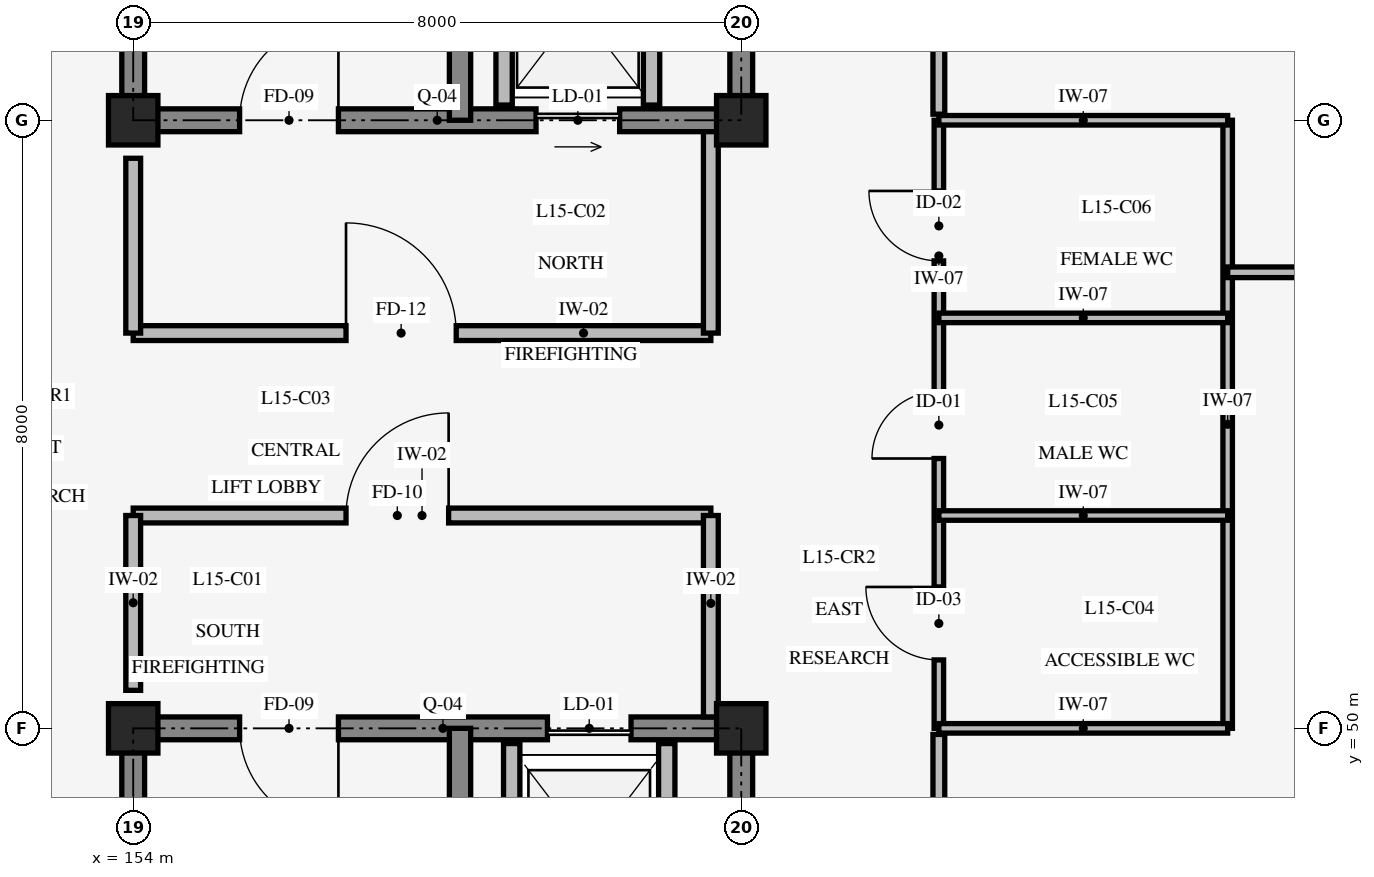
"""IFC4 building model, lengths in metres.
Left out: names, types, materials, properties, quantities, classifications, styles, units other than length and angle.
Written with IfcOpenShell. Run it as: python <this file> out.ifc"""

import sys

from ifc_helpers import new_model, si_unit, direction, frame, frame_2d, origin, origin_2d, place, context, subcontext, project, spatial, rectangle, extrude, element, fill, save


model = new_model("IFC4")
c1 = context("Model", 3, precision=1e-05, world=origin(), true_north=direction((0.0, 1.0)))
c2 = subcontext(c1, "Body", "Model", "MODEL_VIEW")
j1 = project(units=[si_unit("LENGTHUNIT", "METRE"), si_unit("PLANEANGLEUNIT", "RADIAN")], contexts=[c1])
p1 = place(None, origin())
s1 = spatial("IfcSite", under=j1, at=p1, CompositionType="ELEMENT")
p2 = place(p1, origin())
s2 = spatial("IfcBuilding", under=s1, at=p2, CompositionType="ELEMENT")
p3 = place(p2, frame((0.0, 0.0, 61.2)))
s3 = spatial("IfcBuildingStorey", under=s2, at=p3, CompositionType="ELEMENT", Elevation=61.2)
p4 = place(p3, frame((162.0, 42.0, 0.0), z_axis=(0.0, 0.0, 1.0), x_axis=(0.0, 1.0, 0.0)))
e1 = element("IfcWall", 1, at=p4, inside=s3, PredefinedType="SHEAR", context=c2, shape_type="SweptSolid", body=[
    extrude(rectangle(XDim=8.0, YDim=0.3, at=frame_2d((4.0, 0.0))), origin(), (0.0, 0.0, 1.0), 3.95),
])
p5 = place(p4, frame((3.175, 0.0, 0.0)))
e2 = element("IfcOpeningElement", 2, at=p5, cuts=e1, PredefinedType="OPENING", context=c2, shape_type="SweptSolid", body=[
    extrude(rectangle(XDim=1.05, YDim=2.2, at=frame_2d((0.525, 1.1))), frame((0.0, 0.16, 0.0), z_axis=(0.0, -1.0, 0.0), x_axis=(1.0, 0.0, 0.0)), (0.0, 0.0, 1.0), 0.32),
])
p6 = place(p3, frame((162.0, 50.0, 0.0), z_axis=(0.0, 0.0, 1.0), x_axis=(-1.0, 0.0, 0.0)))
e3 = element("IfcWall", 3, at=p6, inside=s3, PredefinedType="SHEAR", context=c2, shape_type="SweptSolid", body=[
    extrude(rectangle(XDim=8.0, YDim=0.3, at=frame_2d((4.0, 0.0))), origin(), (0.0, 0.0, 1.0), 3.95),
])
p7 = place(p6, frame((5.3, 0.0, 0.0)))
e4 = element("IfcOpeningElement", 4, at=p7, cuts=e3, PredefinedType="OPENING", context=c2, shape_type="SweptSolid", body=[
    extrude(rectangle(XDim=1.3, YDim=2.15, at=frame_2d((0.65, 1.075))), frame((0.0, 0.16, 0.0), z_axis=(0.0, -1.0, 0.0), x_axis=(1.0, 0.0, 0.0)), (0.0, 0.0, 1.0), 0.32),
])
p8 = place(p6, frame((1.45, 0.0, 0.0)))
e5 = element("IfcOpeningElement", 5, at=p8, cuts=e3, PredefinedType="OPENING", context=c2, shape_type="SweptSolid", body=[
    extrude(rectangle(XDim=1.1, YDim=2.2, at=frame_2d((0.55, 1.1))), frame((0.0, 0.16, 0.0), z_axis=(0.0, -1.0, 0.0), x_axis=(1.0, 0.0, 0.0)), (0.0, 0.0, 1.0), 0.32),
])
p9 = place(p3, frame((154.0, 50.0, 0.0), z_axis=(0.0, 0.0, 1.0), x_axis=(0.0, -1.0, 0.0)))
e6 = element("IfcWall", 6, at=p9, inside=s3, PredefinedType="SHEAR", context=c2, shape_type="SweptSolid", body=[
    extrude(rectangle(XDim=8.0, YDim=0.3, at=frame_2d((4.0, 0.0))), origin(), (0.0, 0.0, 1.0), 3.95),
])
p10 = place(p3, frame((158.3, 42.0, 0.0), z_axis=(0.0, 0.0, 1.0), x_axis=(0.0, 1.0, 0.0)))
e7 = element("IfcWall", 7, at=p10, inside=s3, PredefinedType="SHEAR", context=c2, shape_type="SweptSolid", body=[
    extrude(rectangle(XDim=8.0, YDim=0.28, at=frame_2d((4.0, 0.0))), origin(), (0.0, 0.0, 1.0), 3.95),
])
p11 = place(p3, frame((154.0, 58.0, 0.0), z_axis=(0.0, 0.0, 1.0), x_axis=(1.0, 0.0, 0.0)))
e8 = element("IfcWall", 8, at=p11, inside=s3, PredefinedType="SHEAR", context=c2, shape_type="SweptSolid", body=[
    extrude(rectangle(XDim=8.0, YDim=0.3, at=frame_2d((4.0, 0.0))), origin(), (0.0, 0.0, 1.0), 3.95),
])
p12 = place(p11, frame((1.4, 0.0, 0.0)))
e9 = element("IfcOpeningElement", 9, at=p12, cuts=e8, PredefinedType="OPENING", context=c2, shape_type="SweptSolid", body=[
    extrude(rectangle(XDim=1.3, YDim=2.15, at=frame_2d((0.65, 1.075))), frame((0.0, 0.16, 0.0), z_axis=(0.0, -1.0, 0.0), x_axis=(1.0, 0.0, 0.0)), (0.0, 0.0, 1.0), 0.32),
])
p13 = place(p11, frame((5.3, 0.0, 0.0)))
e10 = element("IfcOpeningElement", 10, at=p13, cuts=e8, PredefinedType="OPENING", context=c2, shape_type="SweptSolid", body=[
    extrude(rectangle(XDim=1.1, YDim=2.2, at=frame_2d((0.55, 1.1))), frame((0.0, 0.16, 0.0), z_axis=(0.0, -1.0, 0.0), x_axis=(1.0, 0.0, 0.0)), (0.0, 0.0, 1.0), 0.32),
])
p14 = place(p3, frame((162.0, 58.0, 0.0), z_axis=(0.0, 0.0, 1.0), x_axis=(0.0, 1.0, 0.0)))
e11 = element("IfcWall", 11, at=p14, inside=s3, PredefinedType="SHEAR", context=c2, shape_type="SweptSolid", body=[
    extrude(rectangle(XDim=8.0, YDim=0.3, at=frame_2d((4.0, 0.0))), origin(), (0.0, 0.0, 1.0), 3.95),
])
p15 = place(p14, frame((3.275, 0.0, 0.0)))
e12 = element("IfcOpeningElement", 12, at=p15, cuts=e11, PredefinedType="OPENING", context=c2, shape_type="SweptSolid", body=[
    extrude(rectangle(XDim=1.05, YDim=2.2, at=frame_2d((0.525, 1.1))), frame((0.0, 0.16, 0.0), z_axis=(0.0, -1.0, 0.0), x_axis=(1.0, 0.0, 0.0)), (0.0, 0.0, 1.0), 0.32),
])
p16 = place(p14, frame((5.45, 0.0, 0.0)))
e13 = element("IfcOpeningElement", 13, at=p16, cuts=e11, PredefinedType="OPENING", context=c2, shape_type="SweptSolid", body=[
    extrude(rectangle(XDim=1.4, YDim=2.3, at=frame_2d((0.7, 1.15))), frame((0.0, 0.16, 0.0), z_axis=(0.0, -1.0, 0.0), x_axis=(1.0, 0.0, 0.0)), (0.0, 0.0, 1.0), 0.32),
])
p17 = place(p3, frame((154.0, 66.0, 0.0), z_axis=(0.0, 0.0, 1.0), x_axis=(0.0, -1.0, 0.0)))
e14 = element("IfcWall", 14, at=p17, inside=s3, PredefinedType="SHEAR", context=c2, shape_type="SweptSolid", body=[
    extrude(rectangle(XDim=8.0, YDim=0.3, at=frame_2d((4.0, 0.0))), origin(), (0.0, 0.0, 1.0), 3.95),
])
p18 = place(p3, frame((158.3, 58.0, 0.0), z_axis=(0.0, 0.0, 1.0), x_axis=(0.0, 1.0, 0.0)))
e15 = element("IfcWall", 15, at=p18, inside=s3, PredefinedType="SHEAR", context=c2, shape_type="SweptSolid", body=[
    extrude(rectangle(XDim=8.0, YDim=0.28, at=frame_2d((4.0, 0.0))), origin(), (0.0, 0.0, 1.0), 3.95),
])
for number, where, z_axis, x_axis in (
    (16, (154.0, 50.0, 0.0), (0.0, 0.0, 1.0), (1.0, 0.0, 0.0)),
    (17, (154.0, 58.0, 0.0), (0.0, 0.0, 1.0), (1.0, 0.0, 0.0)),
    (18, (162.0, 50.0, 0.0), (0.0, 0.0, 1.0), (1.0, 0.0, 0.0)),
    (19, (162.0, 58.0, 0.0), (0.0, 0.0, 1.0), (1.0, 0.0, 0.0)),
):
    element("IfcColumn", number, at=place(p3, frame(where, z_axis=z_axis, x_axis=x_axis)), inside=s3, PredefinedType="COLUMN", context=c2, shape_type="SweptSolid", body=[
        extrude(rectangle(XDim=0.65, YDim=0.65, at=origin_2d()), origin(), (0.0, 0.0, 1.0), 4.2),
    ])
for number, where, z_axis, x_axis in (
    (20, (158.98, 47.02, 0.0), (0.0, 0.0, 1.0), (0.0, 1.0, 0.0)),
    (21, (161.02, 47.02, 0.0), (0.0, 0.0, 1.0), (0.0, 1.0, 0.0)),
):
    element("IfcWall", number, at=place(p3, frame(where, z_axis=z_axis, x_axis=x_axis)), inside=s3, PredefinedType="STANDARD", context=c2, shape_type="SweptSolid", body=[
        extrude(rectangle(XDim=2.78, YDim=0.215, at=frame_2d((1.39, 0.0))), origin(), (0.0, 0.0, 1.0), 3.9),
    ])
for number, where, z_axis, x_axis in (
    (22, (160.82, 58.2, 0.0), (0.0, 0.0, 1.0), (0.0, 1.0, 0.0)),
    (23, (158.88, 58.2, 0.0), (0.0, 0.0, 1.0), (0.0, 1.0, 0.0)),
):
    element("IfcWall", number, at=place(p3, frame(where, z_axis=z_axis, x_axis=x_axis)), inside=s3, PredefinedType="STANDARD", context=c2, shape_type="SweptSolid", body=[
        extrude(rectangle(XDim=2.55, YDim=0.215, at=frame_2d((1.275, 0.0))), origin(), (0.0, 0.0, 1.0), 3.9),
    ])
p19 = place(p3, frame((154.0, 52.8, 0.0), z_axis=(0.0, 0.0, 1.0), x_axis=(1.0, 0.0, 0.0)))
e24 = element("IfcWall", 24, at=p19, inside=s3, PredefinedType="STANDARD", context=c2, shape_type="SweptSolid", body=[
    extrude(rectangle(XDim=7.6, YDim=0.195, at=frame_2d((3.8, 0.0))), origin(), (0.0, 0.0, 1.0), 3.9),
])
p20 = place(p19, frame((2.8, 0.0, 0.0)))
e25 = element("IfcOpeningElement", 25, at=p20, cuts=e24, PredefinedType="OPENING", context=c2, shape_type="SweptSolid", body=[
    extrude(rectangle(XDim=1.35, YDim=2.15, at=frame_2d((0.675, 1.075))), frame((0.0, 0.107, 0.0), z_axis=(0.0, -1.0, 0.0), x_axis=(1.0, 0.0, 0.0)), (0.0, 0.0, 1.0), 0.215),
])
p21 = place(p3, frame((161.6, 50.15, 0.0), z_axis=(0.0, 0.0, 1.0), x_axis=(0.0, 1.0, 0.0)))
e26 = element("IfcWall", 26, at=p21, inside=s3, PredefinedType="STANDARD", context=c2, shape_type="SweptSolid", body=[
    extrude(rectangle(XDim=2.65, YDim=0.195, at=frame_2d((1.325, 0.0))), origin(), (0.0, 0.0, 1.0), 3.29),
])
p22 = place(p3, frame((154.0, 50.5, 0.0), z_axis=(0.0, 0.0, 1.0), x_axis=(0.0, 1.0, 0.0)))
e27 = element("IfcWall", 27, at=p22, inside=s3, PredefinedType="STANDARD", context=c2, shape_type="SweptSolid", body=[
    extrude(rectangle(XDim=2.3, YDim=0.195, at=frame_2d((1.15, 0.0))), origin(), (0.0, 0.0, 1.0), 3.29),
])
p23 = place(p3, frame((154.0, 55.2, 0.0), z_axis=(0.0, 0.0, 1.0), x_axis=(1.0, 0.0, 0.0)))
e28 = element("IfcWall", 28, at=p23, inside=s3, PredefinedType="STANDARD", context=c2, shape_type="SweptSolid", body=[
    extrude(rectangle(XDim=7.6, YDim=0.195, at=frame_2d((3.8, 0.0))), origin(), (0.0, 0.0, 1.0), 3.9),
])
p24 = place(p23, frame((2.8, 0.0, 0.0)))
e29 = element("IfcOpeningElement", 29, at=p24, cuts=e28, PredefinedType="OPENING", context=c2, shape_type="SweptSolid", body=[
    extrude(rectangle(XDim=1.45, YDim=2.2, at=frame_2d((0.725, 1.1))), frame((0.0, 0.107, 0.0), z_axis=(0.0, -1.0, 0.0), x_axis=(1.0, 0.0, 0.0)), (0.0, 0.0, 1.0), 0.215),
])
p25 = place(p3, frame((161.6, 55.2, 0.0), z_axis=(0.0, 0.0, 1.0), x_axis=(0.0, 1.0, 0.0)))
e30 = element("IfcWall", 30, at=p25, inside=s3, PredefinedType="STANDARD", context=c2, shape_type="SweptSolid", body=[
    extrude(rectangle(XDim=2.65, YDim=0.195, at=frame_2d((1.325, 0.0))), origin(), (0.0, 0.0, 1.0), 3.29),
])
p26 = place(p3, frame((154.0, 55.2, 0.0), z_axis=(0.0, 0.0, 1.0), x_axis=(0.0, 1.0, 0.0)))
e31 = element("IfcWall", 31, at=p26, inside=s3, PredefinedType="STANDARD", context=c2, shape_type="SweptSolid", body=[
    extrude(rectangle(XDim=2.3, YDim=0.195, at=frame_2d((1.15, 0.0))), origin(), (0.0, 0.0, 1.0), 3.29),
])
p27 = place(p3, frame((164.6, 50.0, 0.0), z_axis=(0.0, 0.0, 1.0), x_axis=(0.0, 1.0, 0.0)))
e32 = element("IfcWall", 32, at=p27, inside=s3, PredefinedType="STANDARD", context=c2, shape_type="SweptSolid", body=[
    extrude(rectangle(XDim=8.0, YDim=0.125, at=frame_2d((4.0, 0.0))), origin(), (0.0, 0.0, 1.0), 3.9),
])
p28 = place(p27, frame((0.9, 0.0, 0.0)))
e33 = element("IfcOpeningElement", 33, at=p28, cuts=e32, PredefinedType="OPENING", context=c2, shape_type="SweptSolid", body=[
    extrude(rectangle(XDim=0.96, YDim=2.08, at=frame_2d((0.48, 1.04))), frame((0.0, 0.073, 0.0), z_axis=(0.0, -1.0, 0.0), x_axis=(1.0, 0.0, 0.0)), (0.0, 0.0, 1.0), 0.145),
])
p29 = place(p27, frame((3.55, 0.0, 0.0)))
e34 = element("IfcOpeningElement", 34, at=p29, cuts=e32, PredefinedType="OPENING", context=c2, shape_type="SweptSolid", body=[
    extrude(rectangle(XDim=0.88, YDim=2.05, at=frame_2d((0.44, 1.025))), frame((0.0, 0.073, 0.0), z_axis=(0.0, -1.0, 0.0), x_axis=(1.0, 0.0, 0.0)), (0.0, 0.0, 1.0), 0.145),
])
p30 = place(p27, frame((6.15, 0.0, 0.0)))
e35 = element("IfcOpeningElement", 35, at=p30, cuts=e32, PredefinedType="OPENING", context=c2, shape_type="SweptSolid", body=[
    extrude(rectangle(XDim=0.92, YDim=2.05, at=frame_2d((0.46, 1.025))), frame((0.0, 0.073, 0.0), z_axis=(0.0, -1.0, 0.0), x_axis=(1.0, 0.0, 0.0)), (0.0, 0.0, 1.0), 0.145),
])
p31 = place(p3, frame((168.4, 50.0, 0.0), z_axis=(0.0, 0.0, 1.0), x_axis=(0.0, 1.0, 0.0)))
e36 = element("IfcWall", 36, at=p31, inside=s3, PredefinedType="STANDARD", context=c2, shape_type="SweptSolid", body=[
    extrude(rectangle(XDim=8.0, YDim=0.125, at=frame_2d((4.0, 0.0))), origin(), (0.0, 0.0, 1.0), 3.9),
])
p32 = place(p3, frame((164.6, 50.0, 0.0), z_axis=(0.0, 0.0, 1.0), x_axis=(1.0, 0.0, 0.0)))
e37 = element("IfcWall", 37, at=p32, inside=s3, PredefinedType="STANDARD", context=c2, shape_type="SweptSolid", body=[
    extrude(rectangle(XDim=3.8, YDim=0.125, at=frame_2d((1.9, 0.0))), origin(), (0.0, 0.0, 1.0), 3.24),
])
for number, where, z_axis, x_axis in (
    (38, (164.6, 52.8, 0.0), (0.0, 0.0, 1.0), (1.0, 0.0, 0.0)),
    (39, (164.6, 55.4, 0.0), (0.0, 0.0, 1.0), (1.0, 0.0, 0.0)),
):
    element("IfcWall", number, at=place(p3, frame(where, z_axis=z_axis, x_axis=x_axis)), inside=s3, PredefinedType="STANDARD", context=c2, shape_type="SweptSolid", body=[
        extrude(rectangle(XDim=3.8, YDim=0.125, at=frame_2d((1.9, 0.0))), origin(), (0.0, 0.0, 1.0), 3.9),
    ])
p33 = place(p3, frame((164.6, 58.0, 0.0), z_axis=(0.0, 0.0, 1.0), x_axis=(1.0, 0.0, 0.0)))
e40 = element("IfcWall", 40, at=p33, inside=s3, PredefinedType="STANDARD", context=c2, shape_type="SweptSolid", body=[
    extrude(rectangle(XDim=3.8, YDim=0.125, at=frame_2d((1.9, 0.0))), origin(), (0.0, 0.0, 1.0), 3.24),
])
p34 = place(p3, frame((164.6, 42.05, 0.0), z_axis=(0.0, 0.0, 1.0), x_axis=(0.0, 1.0, 0.0)))
e41 = element("IfcWall", 41, at=p34, inside=s3, PredefinedType="STANDARD", context=c2, shape_type="SweptSolid", body=[
    extrude(rectangle(XDim=7.87, YDim=0.155, at=frame_2d((3.935, 0.0))), origin(), (0.0, 0.0, 1.0), 3.9),
])
p35 = place(p34, frame((3.16, 0.0, 0.0)))
e42 = element("IfcOpeningElement", 42, at=p35, cuts=e41, PredefinedType="OPENING", context=c2, shape_type="SweptSolid", body=[
    extrude(rectangle(XDim=1.55, YDim=2.25, at=frame_2d((0.775, 1.125))), frame((0.0, 0.087, 0.0), z_axis=(0.0, -1.0, 0.0), x_axis=(1.0, 0.0, 0.0)), (0.0, 0.0, 1.0), 0.175),
])
p36 = place(p3, frame((168.4, 56.0, 0.0), z_axis=(0.0, 0.0, 1.0), x_axis=(1.0, 0.0, 0.0)))
e43 = element("IfcWall", 43, at=p36, inside=s3, PredefinedType="STANDARD", context=c2, shape_type="SweptSolid", body=[
    extrude(rectangle(XDim=8.96, YDim=0.14, at=frame_2d((4.48, 0.0))), origin(), (0.0, 0.0, 1.0), 3.9),
])
p37 = place(p36, frame((4.0, 0.0, 0.0)))
e44 = element("IfcOpeningElement", 44, at=p37, cuts=e43, PredefinedType="OPENING", context=c2, shape_type="SweptSolid", body=[
    extrude(rectangle(XDim=0.96, YDim=2.08, at=frame_2d((0.48, 1.04))), frame((0.0, 0.08, 0.0), z_axis=(0.0, -1.0, 0.0), x_axis=(1.0, 0.0, 0.0)), (0.0, 0.0, 1.0), 0.16),
])
p38 = place(p3, frame((164.6, 58.08, 0.0), z_axis=(0.0, 0.0, 1.0), x_axis=(0.0, 1.0, 0.0)))
e45 = element("IfcWall", 45, at=p38, inside=s3, PredefinedType="STANDARD", context=c2, shape_type="SweptSolid", body=[
    extrude(rectangle(XDim=7.87, YDim=0.155, at=frame_2d((3.935, 0.0))), origin(), (0.0, 0.0, 1.0), 3.9),
])
p39 = place(p38, frame((3.135, 0.0, 0.0)))
e46 = element("IfcOpeningElement", 46, at=p39, cuts=e45, PredefinedType="OPENING", context=c2, shape_type="SweptSolid", body=[
    extrude(rectangle(XDim=1.6, YDim=2.25, at=frame_2d((0.8, 1.125))), frame((0.0, 0.087, 0.0), z_axis=(0.0, -1.0, 0.0), x_axis=(1.0, 0.0, 0.0)), (0.0, 0.0, 1.0), 0.175),
])
p40 = place(p7, origin())
e47 = element("IfcDoor", 47, at=p40, inside=s3, OperationType="SINGLE_SWING_LEFT", PredefinedType="DOOR", context=c2, shape_type="SweptSolid", body=[
    extrude(rectangle(XDim=1.3, YDim=2.15, at=frame_2d((0.65, 1.075))), frame((0.0, 0.025, 0.0), z_axis=(0.0, -1.0, 0.0), x_axis=(1.0, 0.0, 0.0)), (0.0, 0.0, 1.0), 0.05),
])
fill(e4, e47)
p41 = place(p8, origin())
e48 = element("IfcDoor", 48, at=p41, inside=s3, OperationType="SLIDING_TO_LEFT", PredefinedType="DOOR", context=c2, shape_type="SweptSolid", body=[
    extrude(rectangle(XDim=1.1, YDim=2.2, at=frame_2d((0.55, 1.1))), frame((0.0, 0.025, 0.0), z_axis=(0.0, -1.0, 0.0), x_axis=(1.0, 0.0, 0.0)), (0.0, 0.0, 1.0), 0.05),
])
fill(e5, e48)
p42 = place(p12, origin())
e49 = element("IfcDoor", 49, at=p42, inside=s3, OperationType="SINGLE_SWING_RIGHT", PredefinedType="DOOR", context=c2, shape_type="SweptSolid", body=[
    extrude(rectangle(XDim=1.3, YDim=2.15, at=frame_2d((0.65, 1.075))), frame((0.0, 0.025, 0.0), z_axis=(0.0, -1.0, 0.0), x_axis=(1.0, 0.0, 0.0)), (0.0, 0.0, 1.0), 0.05),
])
fill(e9, e49)
p43 = place(p13, origin())
e50 = element("IfcDoor", 50, at=p43, inside=s3, OperationType="SLIDING_TO_RIGHT", PredefinedType="DOOR", context=c2, shape_type="SweptSolid", body=[
    extrude(rectangle(XDim=1.1, YDim=2.2, at=frame_2d((0.55, 1.1))), frame((0.0, 0.025, 0.0), z_axis=(0.0, -1.0, 0.0), x_axis=(1.0, 0.0, 0.0)), (0.0, 0.0, 1.0), 0.05),
])
fill(e10, e50)
p44 = place(p20, origin())
e51 = element("IfcDoor", 51, at=p44, inside=s3, OperationType="SINGLE_SWING_RIGHT", PredefinedType="DOOR", context=c2, shape_type="SweptSolid", body=[
    extrude(rectangle(XDim=1.35, YDim=2.15, at=frame_2d((0.675, 1.075))), frame((0.0, 0.025, 0.0), z_axis=(0.0, -1.0, 0.0), x_axis=(1.0, 0.0, 0.0)), (0.0, 0.0, 1.0), 0.05),
])
fill(e25, e51)
p45 = place(p24, origin())
e52 = element("IfcDoor", 52, at=p45, inside=s3, OperationType="SINGLE_SWING_LEFT", PredefinedType="DOOR", context=c2, shape_type="SweptSolid", body=[
    extrude(rectangle(XDim=1.45, YDim=2.2, at=frame_2d((0.725, 1.1))), frame((0.0, 0.025, 0.0), z_axis=(0.0, -1.0, 0.0), x_axis=(1.0, 0.0, 0.0)), (0.0, 0.0, 1.0), 0.05),
])
fill(e29, e52)
p46 = place(p28, origin())
e53 = element("IfcDoor", 53, at=p46, inside=s3, OperationType="SINGLE_SWING_RIGHT", PredefinedType="DOOR", context=c2, shape_type="SweptSolid", body=[
    extrude(rectangle(XDim=0.96, YDim=2.08, at=frame_2d((0.48, 1.04))), frame((0.0, 0.025, 0.0), z_axis=(0.0, -1.0, 0.0), x_axis=(1.0, 0.0, 0.0)), (0.0, 0.0, 1.0), 0.05),
])
fill(e33, e53)
p47 = place(p29, origin())
e54 = element("IfcDoor", 54, at=p47, inside=s3, OperationType="SINGLE_SWING_LEFT", PredefinedType="DOOR", context=c2, shape_type="SweptSolid", body=[
    extrude(rectangle(XDim=0.88, YDim=2.05, at=frame_2d((0.44, 1.025))), frame((0.0, 0.025, 0.0), z_axis=(0.0, -1.0, 0.0), x_axis=(1.0, 0.0, 0.0)), (0.0, 0.0, 1.0), 0.05),
])
fill(e34, e54)
p48 = place(p30, origin())
e55 = element("IfcDoor", 55, at=p48, inside=s3, OperationType="SINGLE_SWING_RIGHT", PredefinedType="DOOR", context=c2, shape_type="SweptSolid", body=[
    extrude(rectangle(XDim=0.92, YDim=2.05, at=frame_2d((0.46, 1.025))), frame((0.0, 0.025, 0.0), z_axis=(0.0, -1.0, 0.0), x_axis=(1.0, 0.0, 0.0)), (0.0, 0.0, 1.0), 0.05),
])
fill(e35, e55)
save(model, sys.argv[1])
